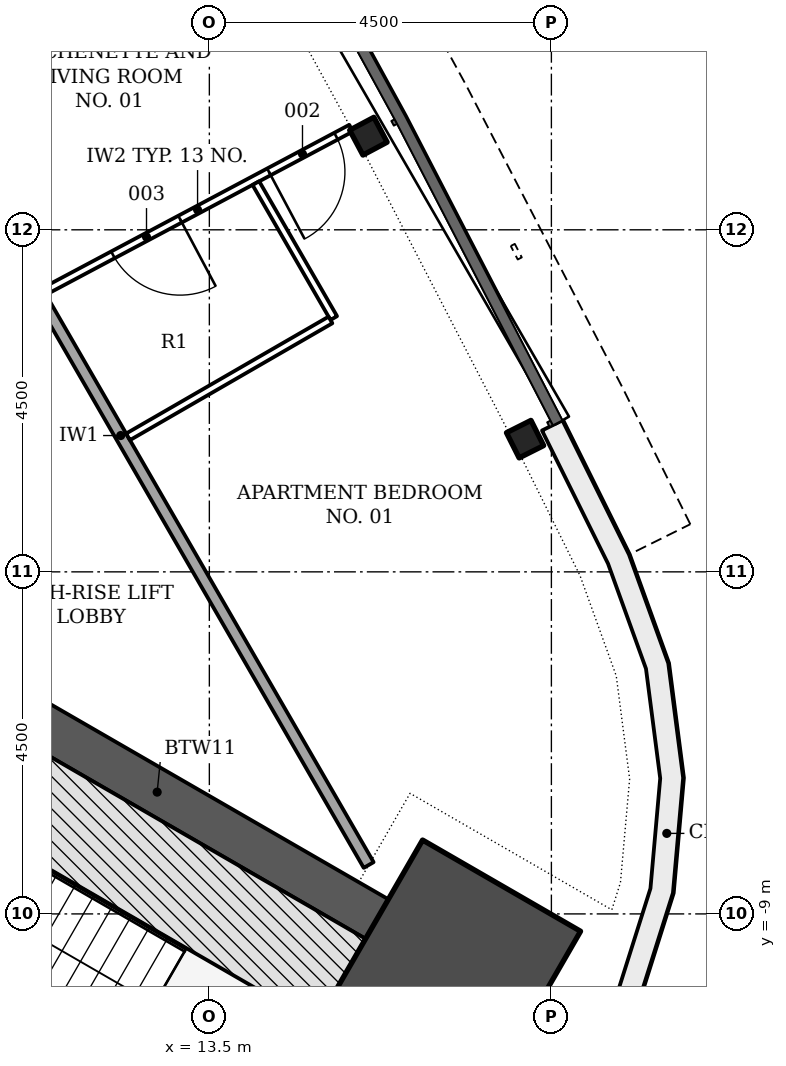
"""IFC4 building model, lengths in metres.
Left out: names, types, materials, properties, quantities, classifications, styles, units other than length and angle.
Written with IfcOpenShell. Run it as: python <this file> out.ifc"""

import sys

from ifc_helpers import new_model, si_unit, direction, frame, frame_2d, origin, origin_2d, place, context, subcontext, project, spatial, polyline, rectangle, i_section, outline, extrude, element, fill, save


model = new_model("IFC4")
c1 = context("Model", 3, precision=1e-05, world=origin(), true_north=direction((0.0, 1.0)))
c2 = subcontext(c1, "Body", "Model", "MODEL_VIEW")
j1 = project(units=[si_unit("LENGTHUNIT", "METRE"), si_unit("PLANEANGLEUNIT", "RADIAN")], contexts=[c1])
p1 = place(None, origin())
s1 = spatial("IfcSite", under=j1, at=p1, CompositionType="ELEMENT")
p2 = place(p1, origin())
s2 = spatial("IfcBuilding", under=s1, at=p2, CompositionType="ELEMENT")
p3 = place(p2, frame((0.0, 0.0, 263.4)))
s3 = spatial("IfcBuildingStorey", under=s2, at=p3, CompositionType="ELEMENT", Elevation=263.4)
p4 = place(p3, frame((9.922, -5.728, -0.2), z_axis=(0.0, 0.0, 1.0), x_axis=(0.866032176823, -0.499988268569, 0.0)))
e1 = element("IfcWall", 1, at=p4, inside=s3, PredefinedType="SHEAR", context=c2, shape_type="SweptSolid", body=[
    extrude(rectangle(XDim=6.678, YDim=0.6, at=frame_2d((3.339, 0.0))), origin(), (0.0, 0.0, 1.0), 3.6),
])
p5 = place(p3, frame((16.745, -9.667, -0.2), z_axis=(0.0, 0.0, 1.0), x_axis=(0.866025403784, -0.5, 0.0)))
e2 = element("IfcColumn", 2, at=p5, inside=s3, PredefinedType="COLUMN", context=c2, shape_type="SweptSolid", body=[
    extrude(rectangle(XDim=2.4, YDim=2.4, at=origin_2d()), origin(), (0.0, 0.0, 1.0), 3.6),
])
for number, where, z_axis, x_axis in (
    (3, (17.654, -2.754, -0.2), (0.0, 0.0, 1.0), (-0.449, 0.894, 0.0)),
    (4, (15.593, 1.232, -0.2), (0.0, 0.0, 1.0), (-0.47, 0.883, 0.0)),
):
    element("IfcColumn", number, at=place(p3, frame(where, z_axis=z_axis, x_axis=x_axis)), inside=s3, PredefinedType="COLUMN", context=c2, shape_type="SweptSolid", body=[
        extrude(i_section(OverallWidth=0.371, OverallDepth=0.361, WebThickness=0.012, FlangeThickness=0.02, FilletRadius=0.015, at=origin_2d()), origin(), (0.0, 0.0, 1.0), 3.6),
    ])
p6 = place(p3, origin())
e5 = element("IfcWall", 5, at=p6, inside=s3, PredefinedType="NOTDEFINED", context=c2, shape_type="SweptSolid", body=[
    extrude(outline(polyline([(11.244, -14.46), (13.211, -14.336), (14.708, -14.069), (16.111, -13.485), (17.355, -12.611), (18.381, -11.49), (19.141, -10.174), (19.599, -8.724), (19.733, -7.21), (19.538, -5.703), (19.021, -4.273), (18.145, -2.507), (17.876, -2.64), (18.745, -4.391), (19.244, -5.774), (19.432, -7.216), (19.303, -8.665), (18.865, -10.052), (18.138, -11.312), (17.156, -12.385), (15.965, -13.22), (14.623, -13.779), (13.176, -14.038), (11.225, -14.161), (11.244, -14.46)])), origin(), (0.0, 0.0, 1.0), 3.3),
])
p7 = place(p3, frame((9.45, -6.545, -0.2), z_axis=(0.0, 0.0, 1.0), x_axis=(0.866016347338, -0.500015685897, 0.0)))
e6 = element("IfcWall", 6, at=p7, inside=s3, PredefinedType="SHEAR", context=c2, shape_type="SweptSolid", body=[
    extrude(rectangle(XDim=6.678, YDim=1.286, at=frame_2d((3.339, 0.0))), origin(), (0.0, 0.0, 1.0), 3.6),
])
p8 = place(p3, frame((15.596, -8.357, 0.0), z_axis=(0.0, 0.0, 1.0), x_axis=(-0.500010741103, 0.866019202317, 0.0)))
e7 = element("IfcWall", 7, at=p8, inside=s3, PredefinedType="PARTITIONING", context=c2, shape_type="SweptSolid", body=[
    extrude(rectangle(XDim=13.049, YDim=0.15, at=frame_2d((6.524, 0.0))), origin(), (0.0, 0.0, 1.0), 2.852),
])
p9 = place(p3, frame((15.364, 1.337, 0.0), z_axis=(0.0, 0.0, 1.0), x_axis=(-0.882891694615, -0.469576676997, 0.0)))
e8 = element("IfcWall", 8, at=p9, inside=s3, PredefinedType="PARTITIONING", context=c2, shape_type="SweptSolid", body=[
    extrude(rectangle(XDim=4.574, YDim=0.1, at=frame_2d((2.287, 0.0))), origin(), (0.0, 0.0, 1.0), 3.4),
])
p10 = place(p9, frame((0.223, 0.0, 0.0)))
e9 = element("IfcOpeningElement", 9, at=p10, cuts=e8, PredefinedType="OPENING", context=c2, shape_type="SweptSolid", body=[
    extrude(rectangle(XDim=1.0, YDim=2.1, at=frame_2d((0.5, 1.05))), frame((0.0, 0.06, 0.0), z_axis=(0.0, -1.0, 0.0), x_axis=(1.0, 0.0, 0.0)), (0.0, 0.0, 1.0), 0.12),
])
p11 = place(p9, frame((2.548, 0.0, 0.0)))
e10 = element("IfcOpeningElement", 10, at=p11, cuts=e8, PredefinedType="OPENING", context=c2, shape_type="SweptSolid", body=[
    extrude(rectangle(XDim=1.0, YDim=2.1, at=frame_2d((0.5, 1.05))), frame((0.0, 0.06, 0.0), z_axis=(0.0, -1.0, 0.0), x_axis=(1.0, 0.0, 0.0)), (0.0, 0.0, 1.0), 0.12),
])
p12 = place(p3, frame((14.112, 0.614, 0.0), z_axis=(0.0, 0.0, 1.0), x_axis=(0.500007699544, -0.866020958405, 0.0)))
e11 = element("IfcWall", 11, at=p12, inside=s3, PredefinedType="PARTITIONING", context=c2, shape_type="SweptSolid", body=[
    extrude(rectangle(XDim=2.05, YDim=0.1, at=frame_2d((1.025, 0.0))), origin(), (0.0, 0.0, 1.0), 2.852),
])
p13 = place(p3, frame((15.094, -1.186, 0.0), z_axis=(0.0, 0.0, 1.0), x_axis=(-0.866050731258, -0.499956128963, 0.0)))
e12 = element("IfcWall", 12, at=p13, inside=s3, PredefinedType="PARTITIONING", context=c2, shape_type="SweptSolid", body=[
    extrude(rectangle(XDim=3.075, YDim=0.1, at=frame_2d((1.538, 0.0))), origin(), (0.0, 0.0, 1.0), 3.4),
])
p14 = place(p10, origin())
e13 = element("IfcDoor", 13, at=p14, inside=s3, OperationType="SINGLE_SWING_RIGHT", PredefinedType="DOOR", context=c2, shape_type="SweptSolid", body=[
    extrude(rectangle(XDim=1.0, YDim=2.1, at=frame_2d((0.5, 1.05))), frame((0.0, 0.025, 0.0), z_axis=(0.0, -1.0, 0.0), x_axis=(1.0, 0.0, 0.0)), (0.0, 0.0, 1.0), 0.05),
])
fill(e9, e13)
p15 = place(p11, origin())
e14 = element("IfcDoor", 14, at=p15, inside=s3, OperationType="SINGLE_SWING_LEFT", PredefinedType="DOOR", context=c2, shape_type="SweptSolid", body=[
    extrude(rectangle(XDim=1.0, YDim=2.1, at=frame_2d((0.5, 1.05))), frame((0.0, 0.025, 0.0), z_axis=(0.0, -1.0, 0.0), x_axis=(1.0, 0.0, 0.0)), (0.0, 0.0, 1.0), 0.05),
])
fill(e10, e14)
save(model, sys.argv[1])
